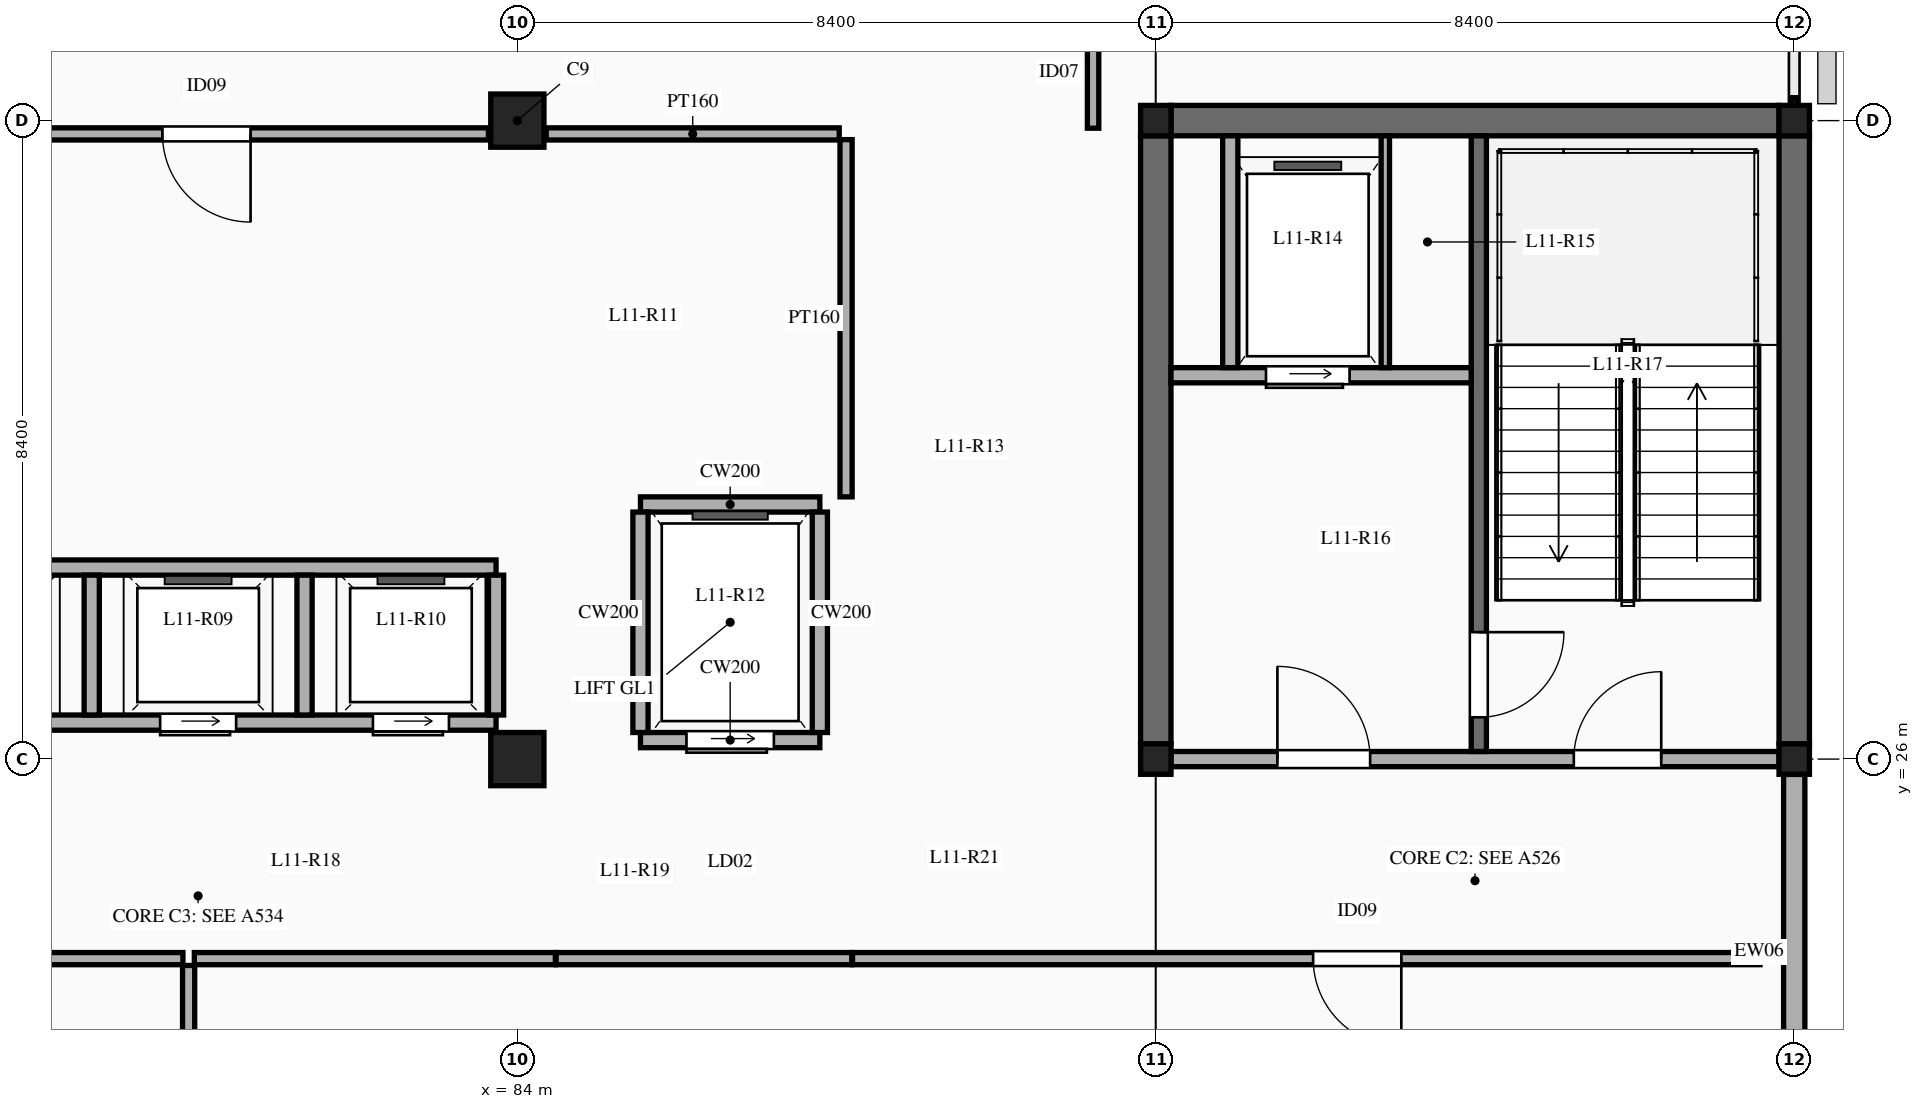
"""IFC4 building model, lengths in metres.
Left out: names, types, materials, properties, quantities, classifications, styles, units other than length and angle.
Written with IfcOpenShell. Run it as: python <this file> out.ifc"""

import sys

from ifc_helpers import new_model, si_unit, direction, frame, frame_2d, origin, origin_2d, place, context, subcontext, project, spatial, rectangle, extrude, element, fill, save


model = new_model("IFC4")
c1 = context("Model", 3, precision=1e-05, world=origin(), true_north=direction((0.0, 1.0)))
c2 = subcontext(c1, "Body", "Model", "MODEL_VIEW")
j1 = project(units=[si_unit("LENGTHUNIT", "METRE"), si_unit("PLANEANGLEUNIT", "RADIAN")], contexts=[c1])
p1 = place(None, origin())
s1 = spatial("IfcSite", under=j1, at=p1, CompositionType="ELEMENT")
p2 = place(p1, origin())
s2 = spatial("IfcBuilding", under=s1, at=p2, CompositionType="ELEMENT")
p3 = place(p2, frame((0.0, 0.0, 51.0)))
s3 = spatial("IfcBuildingStorey", under=s2, at=p3, CompositionType="ELEMENT", Elevation=51.0)
for number, where, z_axis, x_axis in (
    (1, (84.0, 26.0, 0.0), (0.0, 0.0, 1.0), (1.0, 0.0, 0.0)),
    (2, (84.0, 34.4, 0.0), (0.0, 0.0, 1.0), (1.0, 0.0, 0.0)),
):
    element("IfcColumn", number, at=place(p3, frame(where, z_axis=z_axis, x_axis=x_axis)), inside=s3, PredefinedType="COLUMN", context=c2, shape_type="SweptSolid", body=[
        extrude(rectangle(XDim=0.7, YDim=0.7, at=origin_2d()), origin(), (0.0, 0.0, 1.0), 4.5),
    ])
for number, where, z_axis, x_axis in (
    (3, (92.4, 26.0, 0.0), (0.0, 0.0, 1.0), (1.0, 0.0, 0.0)),
    (4, (92.4, 34.4, 0.0), (0.0, 0.0, 1.0), (1.0, 0.0, 0.0)),
    (5, (100.8, 26.0, 0.0), (0.0, 0.0, 1.0), (1.0, 0.0, 0.0)),
    (6, (100.8, 34.4, 0.0), (0.0, 0.0, 1.0), (1.0, 0.0, 0.0)),
):
    element("IfcColumn", number, at=place(p3, frame(where, z_axis=z_axis, x_axis=x_axis)), inside=s3, PredefinedType="COLUMN", context=c2, shape_type="SweptSolid", body=[
        extrude(rectangle(XDim=0.4, YDim=0.4, at=origin_2d()), origin(), (0.0, 0.0, 1.0), 4.5),
    ])
for number, where, z_axis, x_axis in (
    (7, (92.4, 26.2, 0.0), (0.0, 0.0, 1.0), (0.0, 1.0, 0.0)),
    (8, (100.8, 26.2, 0.0), (0.0, 0.0, 1.0), (0.0, 1.0, 0.0)),
    (9, (92.6, 34.4, 0.0), (0.0, 0.0, 1.0), (1.0, 0.0, 0.0)),
):
    element("IfcWall", number, at=place(p3, frame(where, z_axis=z_axis, x_axis=x_axis)), inside=s3, PredefinedType="SHEAR", context=c2, shape_type="SweptSolid", body=[
        extrude(rectangle(XDim=8.0, YDim=0.4, at=frame_2d((4.0, 0.0))), origin(), (0.0, 0.0, 1.0), 4.5),
    ])
p4 = place(p3, frame((100.8, 17.952, 0.0), z_axis=(0.0, 0.0, 1.0), x_axis=(0.0, 1.0, 0.0)))
e10 = element("IfcWall", 10, at=p4, inside=s3, PredefinedType="ELEMENTEDWALL", context=c2, shape_type="SweptSolid", body=[
    extrude(rectangle(XDim=7.846, YDim=0.28, at=frame_2d((3.923, 0.0))), origin(), (0.0, 0.0, 1.0), 3.55),
])
p5 = place(p4, frame((1.037, 0.0, 0.9)))
e11 = element("IfcOpeningElement", 11, at=p5, cuts=e10, PredefinedType="OPENING", context=c2, shape_type="SweptSolid", body=[
    extrude(rectangle(XDim=1.85, YDim=2.05, at=frame_2d((0.925, 1.025))), frame((0.0, 0.15, 0.0), z_axis=(0.0, -1.0, 0.0), x_axis=(1.0, 0.0, 0.0)), (0.0, 0.0, 1.0), 0.3),
])
p6 = place(p3, frame((92.6, 26.0, 0.0), z_axis=(0.0, 0.0, 1.0), x_axis=(1.0, 0.0, 0.0)))
e12 = element("IfcWall", 12, at=p6, inside=s3, PredefinedType="SOLIDWALL", context=c2, shape_type="SweptSolid", body=[
    extrude(rectangle(XDim=8.0, YDim=0.2, at=frame_2d((4.0, 0.0))), origin(), (0.0, 0.0, 1.0), 3.83),
])
p7 = place(p6, frame((1.4, 0.0, 0.0)))
e13 = element("IfcOpeningElement", 13, at=p7, cuts=e12, PredefinedType="OPENING", context=c2, shape_type="SweptSolid", body=[
    extrude(rectangle(XDim=1.22, YDim=2.15, at=frame_2d((0.61, 1.075))), frame((0.0, 0.11, 0.0), z_axis=(0.0, -1.0, 0.0), x_axis=(1.0, 0.0, 0.0)), (0.0, 0.0, 1.0), 0.22),
])
p8 = place(p6, frame((5.3, 0.0, 0.0)))
e14 = element("IfcOpeningElement", 14, at=p8, cuts=e12, PredefinedType="OPENING", context=c2, shape_type="SweptSolid", body=[
    extrude(rectangle(XDim=1.15, YDim=2.15, at=frame_2d((0.575, 1.075))), frame((0.0, 0.11, 0.0), z_axis=(0.0, -1.0, 0.0), x_axis=(1.0, 0.0, 0.0)), (0.0, 0.0, 1.0), 0.22),
])
p9 = place(p3, frame((96.65, 26.1, 0.0), z_axis=(0.0, 0.0, 1.0), x_axis=(0.0, 1.0, 0.0)))
e15 = element("IfcWall", 15, at=p9, inside=s3, PredefinedType="SOLIDWALL", context=c2, shape_type="SweptSolid", body=[
    extrude(rectangle(XDim=8.1, YDim=0.2, at=frame_2d((4.05, 0.0))), origin(), (0.0, 0.0, 1.0), 4.3),
])
p10 = place(p9, frame((0.45, 0.0, 0.0)))
e16 = element("IfcOpeningElement", 16, at=p10, cuts=e15, PredefinedType="OPENING", context=c2, shape_type="SweptSolid", body=[
    extrude(rectangle(XDim=1.12, YDim=2.15, at=frame_2d((0.56, 1.075))), frame((0.0, 0.11, 0.0), z_axis=(0.0, -1.0, 0.0), x_axis=(1.0, 0.0, 0.0)), (0.0, 0.0, 1.0), 0.22),
])
p11 = place(p3, frame((92.6, 31.05, 0.0), z_axis=(0.0, 0.0, 1.0), x_axis=(1.0, 0.0, 0.0)))
e17 = element("IfcWall", 17, at=p11, inside=s3, PredefinedType="SOLIDWALL", context=c2, shape_type="SweptSolid", body=[
    extrude(rectangle(XDim=3.95, YDim=0.2, at=frame_2d((1.975, 0.0))), origin(), (0.0, 0.0, 1.0), 4.3),
])
p12 = place(p11, frame((1.25, 0.0, 0.0)))
e18 = element("IfcOpeningElement", 18, at=p12, cuts=e17, PredefinedType="OPENING", context=c2, shape_type="SweptSolid", body=[
    extrude(rectangle(XDim=1.1, YDim=2.15, at=frame_2d((0.55, 1.075))), frame((0.0, 0.11, 0.0), z_axis=(0.0, -1.0, 0.0), x_axis=(1.0, 0.0, 0.0)), (0.0, 0.0, 1.0), 0.22),
])
p13 = place(p3, frame((95.42, 31.15, 0.0), z_axis=(0.0, 0.0, 1.0), x_axis=(0.0, 1.0, 0.0)))
e19 = element("IfcWall", 19, at=p13, inside=s3, PredefinedType="PARTITIONING", context=c2, shape_type="SweptSolid", body=[
    extrude(rectangle(XDim=3.05, YDim=0.11, at=frame_2d((1.525, 0.0))), origin(), (0.0, 0.0, 1.0), 4.3),
])
p14 = place(p3, frame((93.38, 31.15, 0.0), z_axis=(0.0, 0.0, 1.0), x_axis=(0.0, 1.0, 0.0)))
e20 = element("IfcWall", 20, at=p14, inside=s3, PredefinedType="SOLIDWALL", context=c2, shape_type="SweptSolid", body=[
    extrude(rectangle(XDim=3.05, YDim=0.2, at=frame_2d((1.525, 0.0))), origin(), (0.0, 0.0, 1.0), 4.3),
])
p15 = place(p3, frame((75.95, 26.48, 0.0), z_axis=(0.0, 0.0, 1.0), x_axis=(1.0, 0.0, 0.0)))
e21 = element("IfcWall", 21, at=p15, inside=s3, PredefinedType="SOLIDWALL", context=c2, shape_type="SweptSolid", body=[
    extrude(rectangle(XDim=7.77, YDim=0.2, at=frame_2d((3.885, 0.0))), origin(), (0.0, 0.0, 1.0), 4.3),
])
p16 = place(p15, frame((0.55, 0.0, 0.0)))
e22 = element("IfcOpeningElement", 22, at=p16, cuts=e21, PredefinedType="OPENING", context=c2, shape_type="SweptSolid", body=[
    extrude(rectangle(XDim=1.0, YDim=2.15, at=frame_2d((0.5, 1.075))), frame((0.0, 0.11, 0.0), z_axis=(0.0, -1.0, 0.0), x_axis=(1.0, 0.0, 0.0)), (0.0, 0.0, 1.0), 0.22),
])
p17 = place(p15, frame((3.35, 0.0, 0.0)))
e23 = element("IfcOpeningElement", 23, at=p17, cuts=e21, PredefinedType="OPENING", context=c2, shape_type="SweptSolid", body=[
    extrude(rectangle(XDim=1.0, YDim=2.15, at=frame_2d((0.5, 1.075))), frame((0.0, 0.11, 0.0), z_axis=(0.0, -1.0, 0.0), x_axis=(1.0, 0.0, 0.0)), (0.0, 0.0, 1.0), 0.22),
])
p18 = place(p15, frame((6.15, 0.0, 0.0)))
e24 = element("IfcOpeningElement", 24, at=p18, cuts=e21, PredefinedType="OPENING", context=c2, shape_type="SweptSolid", body=[
    extrude(rectangle(XDim=1.0, YDim=2.15, at=frame_2d((0.5, 1.075))), frame((0.0, 0.11, 0.0), z_axis=(0.0, -1.0, 0.0), x_axis=(1.0, 0.0, 0.0)), (0.0, 0.0, 1.0), 0.22),
])
p19 = place(p3, frame((75.95, 28.52, 0.0), z_axis=(0.0, 0.0, 1.0), x_axis=(1.0, 0.0, 0.0)))
e25 = element("IfcWall", 25, at=p19, inside=s3, PredefinedType="SOLIDWALL", context=c2, shape_type="SweptSolid", body=[
    extrude(rectangle(XDim=7.77, YDim=0.2, at=frame_2d((3.885, 0.0))), origin(), (0.0, 0.0, 1.0), 4.3),
])
for number, where, z_axis, x_axis in (
    (26, (78.4, 26.58, 0.0), (0.0, 0.0, 1.0), (0.0, 1.0, 0.0)),
    (27, (81.2, 26.58, 0.0), (0.0, 0.0, 1.0), (0.0, 1.0, 0.0)),
):
    element("IfcWall", number, at=place(p3, frame(where, z_axis=z_axis, x_axis=x_axis)), inside=s3, PredefinedType="SOLIDWALL", context=c2, shape_type="SweptSolid", body=[
        extrude(rectangle(XDim=1.84, YDim=0.2, at=frame_2d((0.92, 0.0))), origin(), (0.0, 0.0, 1.0), 4.3),
    ])
p20 = place(p3, frame((83.72, 26.58, 0.0), z_axis=(0.0, 0.0, 1.0), x_axis=(0.0, 1.0, 0.0)))
e28 = element("IfcWall", 28, at=p20, inside=s3, PredefinedType="SOLIDWALL", context=c2, shape_type="SweptSolid", body=[
    extrude(rectangle(XDim=1.84, YDim=0.2, at=frame_2d((0.92, 0.0))), origin(), (0.0, 0.0, 1.0), 3.88),
])
p21 = place(p3, frame((85.62, 26.25, 0.0), z_axis=(0.0, 0.0, 1.0), x_axis=(1.0, 0.0, 0.0)))
e29 = element("IfcWall", 29, at=p21, inside=s3, PredefinedType="SOLIDWALL", context=c2, shape_type="SweptSolid", body=[
    extrude(rectangle(XDim=2.36, YDim=0.2, at=frame_2d((1.18, 0.0))), origin(), (0.0, 0.0, 1.0), 3.83),
])
p22 = place(p21, frame((0.605, 0.0, 0.0)))
e30 = element("IfcOpeningElement", 30, at=p22, cuts=e29, PredefinedType="OPENING", context=c2, shape_type="SweptSolid", body=[
    extrude(rectangle(XDim=1.15, YDim=2.2, at=frame_2d((0.575, 1.1))), frame((0.0, 0.11, 0.0), z_axis=(0.0, -1.0, 0.0), x_axis=(1.0, 0.0, 0.0)), (0.0, 0.0, 1.0), 0.22),
])
p23 = place(p3, frame((85.62, 29.35, 0.0), z_axis=(0.0, 0.0, 1.0), x_axis=(1.0, 0.0, 0.0)))
e31 = element("IfcWall", 31, at=p23, inside=s3, PredefinedType="SOLIDWALL", context=c2, shape_type="SweptSolid", body=[
    extrude(rectangle(XDim=2.36, YDim=0.2, at=frame_2d((1.18, 0.0))), origin(), (0.0, 0.0, 1.0), 4.3),
])
p24 = place(p3, frame((85.62, 26.35, 0.0), z_axis=(0.0, 0.0, 1.0), x_axis=(0.0, 1.0, 0.0)))
e32 = element("IfcWall", 32, at=p24, inside=s3, PredefinedType="SOLIDWALL", context=c2, shape_type="SweptSolid", body=[
    extrude(rectangle(XDim=2.9, YDim=0.2, at=frame_2d((1.45, 0.0))), origin(), (0.0, 0.0, 1.0), 4.3),
])
p25 = place(p3, frame((87.98, 26.35, 0.0), z_axis=(0.0, 0.0, 1.0), x_axis=(0.0, 1.0, 0.0)))
e33 = element("IfcWall", 33, at=p25, inside=s3, PredefinedType="SOLIDWALL", context=c2, shape_type="SweptSolid", body=[
    extrude(rectangle(XDim=2.9, YDim=0.2, at=frame_2d((1.45, 0.0))), origin(), (0.0, 0.0, 1.0), 4.03),
])
p26 = place(p3, frame((88.325, 29.45, 0.0), z_axis=(0.0, 0.0, 1.0), x_axis=(0.0, 1.0, 0.0)))
e34 = element("IfcWall", 34, at=p26, inside=s3, PredefinedType="PARTITIONING", context=c2, shape_type="SweptSolid", body=[
    extrude(rectangle(XDim=4.7, YDim=0.16, at=frame_2d((2.35, 0.0))), origin(), (0.0, 0.0, 1.0), 3.45),
])
p27 = place(p3, frame((76.2, 34.225, 0.0), z_axis=(0.0, 0.0, 1.0), x_axis=(1.0, 0.0, 0.0)))
e35 = element("IfcWall", 35, at=p27, inside=s3, PredefinedType="PARTITIONING", context=c2, shape_type="SweptSolid", body=[
    extrude(rectangle(XDim=7.42, YDim=0.16, at=frame_2d((3.71, 0.0))), origin(), (0.0, 0.0, 1.0), 3.45),
])
p28 = place(p27, frame((3.13, 0.0, 0.0)))
e36 = element("IfcOpeningElement", 36, at=p28, cuts=e35, PredefinedType="OPENING", context=c2, shape_type="SweptSolid", body=[
    extrude(rectangle(XDim=1.16, YDim=2.2, at=frame_2d((0.58, 1.1))), frame((0.0, 0.09, 0.0), z_axis=(0.0, -1.0, 0.0), x_axis=(1.0, 0.0, 0.0)), (0.0, 0.0, 1.0), 0.18),
])
p29 = place(p3, frame((84.38, 34.225, 0.0), z_axis=(0.0, 0.0, 1.0), x_axis=(1.0, 0.0, 0.0)))
e37 = element("IfcWall", 37, at=p29, inside=s3, PredefinedType="PARTITIONING", context=c2, shape_type="SweptSolid", body=[
    extrude(rectangle(XDim=3.855, YDim=0.16, at=frame_2d((1.928, 0.0))), origin(), (0.0, 0.0, 1.0), 3.45),
])
p30 = place(p3, frame((76.05, 23.375, 0.0), z_axis=(0.0, 0.0, 1.0), x_axis=(1.0, 0.0, 0.0)))
e38 = element("IfcWall", 38, at=p30, inside=s3, PredefinedType="PARTITIONING", context=c2, shape_type="SweptSolid", body=[
    extrude(rectangle(XDim=3.55, YDim=0.16, at=frame_2d((1.775, 0.0))), origin(), (0.0, 0.0, 1.0), 3.45),
])
p31 = place(p3, frame((79.75, 23.375, 0.0), z_axis=(0.0, 0.0, 1.0), x_axis=(1.0, 0.0, 0.0)))
e39 = element("IfcWall", 39, at=p31, inside=s3, PredefinedType="PARTITIONING", context=c2, shape_type="SweptSolid", body=[
    extrude(rectangle(XDim=4.75, YDim=0.16, at=frame_2d((2.375, 0.0))), origin(), (0.0, 0.0, 1.0), 3.45),
])
p32 = place(p3, frame((84.51, 23.375, 0.0), z_axis=(0.0, 0.0, 1.0), x_axis=(1.0, 0.0, 0.0)))
e40 = element("IfcWall", 40, at=p32, inside=s3, PredefinedType="PARTITIONING", context=c2, shape_type="SweptSolid", body=[
    extrude(rectangle(XDim=3.89, YDim=0.16, at=frame_2d((1.945, 0.0))), origin(), (0.0, 0.0, 1.0), 3.45),
])
p33 = place(p3, frame((88.41, 23.375, 0.0), z_axis=(0.0, 0.0, 1.0), x_axis=(1.0, 0.0, 0.0)))
e41 = element("IfcWall", 41, at=p33, inside=s3, PredefinedType="PARTITIONING", context=c2, shape_type="SweptSolid", body=[
    extrude(rectangle(XDim=11.94, YDim=0.16, at=frame_2d((5.97, 0.0))), origin(), (0.0, 0.0, 1.0), 3.45),
])
p34 = place(p33, frame((6.06, 0.0, 0.0)))
e42 = element("IfcOpeningElement", 42, at=p34, cuts=e41, PredefinedType="OPENING", context=c2, shape_type="SweptSolid", body=[
    extrude(rectangle(XDim=1.16, YDim=2.2, at=frame_2d((0.58, 1.1))), frame((0.0, 0.09, 0.0), z_axis=(0.0, -1.0, 0.0), x_axis=(1.0, 0.0, 0.0)), (0.0, 0.0, 1.0), 0.18),
])
p35 = place(p3, frame((79.675, 9.65, 0.0), z_axis=(0.0, 0.0, 1.0), x_axis=(0.0, 1.0, 0.0)))
e43 = element("IfcWall", 43, at=p35, inside=s3, PredefinedType="PARTITIONING", context=c2, shape_type="SweptSolid", body=[
    extrude(rectangle(XDim=13.635, YDim=0.16, at=frame_2d((6.817, 0.0))), origin(), (0.0, 0.0, 1.0), 3.45),
])
p36 = place(p3, frame((91.575, 34.3, 0.0), z_axis=(0.0, 0.0, 1.0), x_axis=(0.0, 1.0, 0.0)))
e44 = element("IfcWall", 44, at=p36, inside=s3, PredefinedType="PARTITIONING", context=c2, shape_type="SweptSolid", body=[
    extrude(rectangle(XDim=2.74, YDim=0.15, at=frame_2d((1.37, 0.0))), origin(), (0.0, 0.0, 1.0), 3.45),
])
p37 = place(p36, frame((1.19, 0.0, 0.0)))
e45 = element("IfcOpeningElement", 45, at=p37, cuts=e44, PredefinedType="OPENING", context=c2, shape_type="SweptSolid", body=[
    extrude(rectangle(XDim=1.3, YDim=2.25, at=frame_2d((0.65, 1.125))), frame((0.0, 0.085, 0.0), z_axis=(0.0, -1.0, 0.0), x_axis=(1.0, 0.0, 0.0)), (0.0, 0.0, 1.0), 0.17),
])
p38 = place(p7, origin())
e46 = element("IfcDoor", 46, at=p38, inside=s3, OperationType="SINGLE_SWING_LEFT", PredefinedType="DOOR", context=c2, shape_type="SweptSolid", body=[
    extrude(rectangle(XDim=1.22, YDim=2.15, at=frame_2d((0.61, 1.075))), frame((0.0, 0.025, 0.0), z_axis=(0.0, -1.0, 0.0), x_axis=(1.0, 0.0, 0.0)), (0.0, 0.0, 1.0), 0.05),
])
fill(e13, e46)
p39 = place(p8, origin())
e47 = element("IfcDoor", 47, at=p39, inside=s3, OperationType="SINGLE_SWING_RIGHT", PredefinedType="DOOR", context=c2, shape_type="SweptSolid", body=[
    extrude(rectangle(XDim=1.15, YDim=2.15, at=frame_2d((0.575, 1.075))), frame((0.0, 0.025, 0.0), z_axis=(0.0, -1.0, 0.0), x_axis=(1.0, 0.0, 0.0)), (0.0, 0.0, 1.0), 0.05),
])
fill(e14, e47)
p40 = place(p10, frame((1.12, 0.0, 0.0), z_axis=(0.0, 0.0, 1.0), x_axis=(-1.0, 0.0, 0.0)))
e48 = element("IfcDoor", 48, at=p40, inside=s3, OperationType="SINGLE_SWING_LEFT", PredefinedType="DOOR", context=c2, shape_type="SweptSolid", body=[
    extrude(rectangle(XDim=1.12, YDim=2.15, at=frame_2d((0.56, 1.075))), frame((0.0, 0.025, 0.0), z_axis=(0.0, -1.0, 0.0), x_axis=(1.0, 0.0, 0.0)), (0.0, 0.0, 1.0), 0.05),
])
fill(e16, e48)
p41 = place(p12, frame((1.1, 0.0, 0.0), z_axis=(0.0, 0.0, 1.0), x_axis=(-1.0, 0.0, 0.0)))
e49 = element("IfcDoor", 49, at=p41, inside=s3, OperationType="SLIDING_TO_LEFT", PredefinedType="DOOR", context=c2, shape_type="SweptSolid", body=[
    extrude(rectangle(XDim=1.1, YDim=2.15, at=frame_2d((0.55, 1.075))), frame((0.0, 0.025, 0.0), z_axis=(0.0, -1.0, 0.0), x_axis=(1.0, 0.0, 0.0)), (0.0, 0.0, 1.0), 0.05),
])
fill(e18, e49)
p42 = place(p17, frame((1.0, 0.0, 0.0), z_axis=(0.0, 0.0, 1.0), x_axis=(-1.0, 0.0, 0.0)))
e50 = element("IfcDoor", 50, at=p42, inside=s3, OperationType="SLIDING_TO_LEFT", PredefinedType="DOOR", context=c2, shape_type="SweptSolid", body=[
    extrude(rectangle(XDim=1.0, YDim=2.15, at=frame_2d((0.5, 1.075))), frame((0.0, 0.025, 0.0), z_axis=(0.0, -1.0, 0.0), x_axis=(1.0, 0.0, 0.0)), (0.0, 0.0, 1.0), 0.05),
])
fill(e23, e50)
p43 = place(p18, frame((1.0, 0.0, 0.0), z_axis=(0.0, 0.0, 1.0), x_axis=(-1.0, 0.0, 0.0)))
e51 = element("IfcDoor", 51, at=p43, inside=s3, OperationType="SLIDING_TO_LEFT", PredefinedType="DOOR", context=c2, shape_type="SweptSolid", body=[
    extrude(rectangle(XDim=1.0, YDim=2.15, at=frame_2d((0.5, 1.075))), frame((0.0, 0.025, 0.0), z_axis=(0.0, -1.0, 0.0), x_axis=(1.0, 0.0, 0.0)), (0.0, 0.0, 1.0), 0.05),
])
fill(e24, e51)
p44 = place(p22, frame((1.15, 0.0, 0.0), z_axis=(0.0, 0.0, 1.0), x_axis=(-1.0, 0.0, 0.0)))
e52 = element("IfcDoor", 52, at=p44, inside=s3, OperationType="SLIDING_TO_LEFT", PredefinedType="DOOR", context=c2, shape_type="SweptSolid", body=[
    extrude(rectangle(XDim=1.15, YDim=2.2, at=frame_2d((0.575, 1.1))), frame((0.0, 0.025, 0.0), z_axis=(0.0, -1.0, 0.0), x_axis=(1.0, 0.0, 0.0)), (0.0, 0.0, 1.0), 0.05),
])
fill(e30, e52)
p45 = place(p28, frame((1.16, 0.0, 0.0), z_axis=(0.0, 0.0, 1.0), x_axis=(-1.0, 0.0, 0.0)))
e53 = element("IfcDoor", 53, at=p45, inside=s3, OperationType="SINGLE_SWING_LEFT", PredefinedType="DOOR", context=c2, shape_type="SweptSolid", body=[
    extrude(rectangle(XDim=1.16, YDim=2.2, at=frame_2d((0.58, 1.1))), frame((0.0, 0.025, 0.0), z_axis=(0.0, -1.0, 0.0), x_axis=(1.0, 0.0, 0.0)), (0.0, 0.0, 1.0), 0.05),
])
fill(e36, e53)
p46 = place(p34, frame((1.16, 0.0, 0.0), z_axis=(0.0, 0.0, 1.0), x_axis=(-1.0, 0.0, 0.0)))
e54 = element("IfcDoor", 54, at=p46, inside=s3, OperationType="SINGLE_SWING_LEFT", PredefinedType="DOOR", context=c2, shape_type="SweptSolid", body=[
    extrude(rectangle(XDim=1.16, YDim=2.2, at=frame_2d((0.58, 1.1))), frame((0.0, 0.025, 0.0), z_axis=(0.0, -1.0, 0.0), x_axis=(1.0, 0.0, 0.0)), (0.0, 0.0, 1.0), 0.05),
])
fill(e42, e54)
save(model, sys.argv[1])
